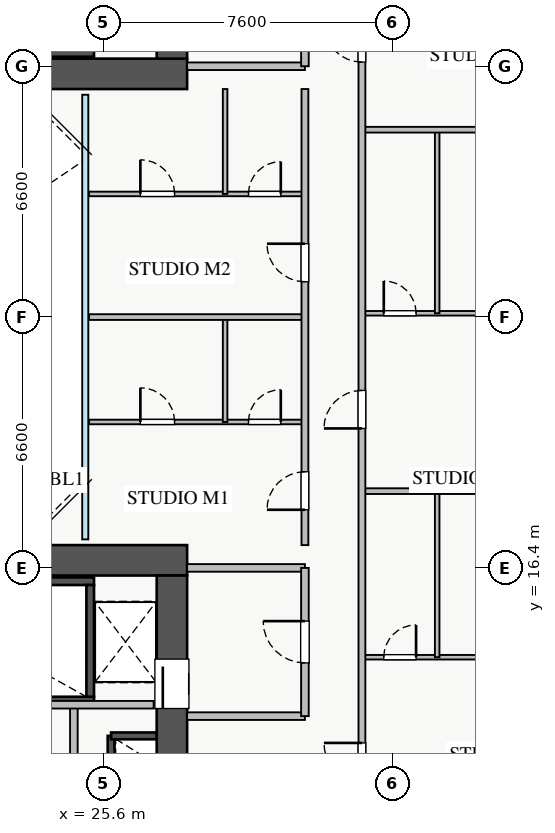
"""IFC4 building model, lengths in metres.
Left out: names, types, materials, properties, quantities, classifications, styles, units other than length and angle.
Written with IfcOpenShell. Run it as: python <this file> out.ifc"""

import sys

from ifc_helpers import new_model, si_unit, direction, frame, frame_2d, origin, place, context, subcontext, project, spatial, rectangle, extrude, source, transform, mapped, element, fill, save


model = new_model("IFC4")
c1 = context("Model", 3, precision=1e-05, world=origin(), true_north=direction((0.0, 1.0)))
c2 = subcontext(c1, "Body", "Model", "MODEL_VIEW")
j1 = project(units=[si_unit("LENGTHUNIT", "METRE"), si_unit("PLANEANGLEUNIT", "RADIAN")], contexts=[c1])
p1 = place(None, origin())
s1 = spatial("IfcSite", under=j1, at=p1, CompositionType="ELEMENT")
p2 = place(p1, origin())
s2 = spatial("IfcBuilding", under=s1, at=p2, CompositionType="ELEMENT")
p3 = place(p2, frame((0.0, 0.0, 53.5)))
s3 = spatial("IfcBuildingStorey", under=s2, at=p3, CompositionType="ELEMENT", Elevation=53.5)
p4 = place(p3, frame((25.8, 10.92, 0.0), z_axis=(0.0, 0.0, 1.0), x_axis=(0.0, 1.0, 0.0)))
e1 = element("IfcWall", 1, at=p4, inside=s3, PredefinedType="SHEAR", context=c2, shape_type="SweptSolid", body=[
    extrude(rectangle(XDim=1.06, YDim=0.18, at=frame_2d((0.53, 0.0))), origin(), (0.0, 0.0, 1.0), 3.07),
])
p5 = place(p3, frame((25.8, 11.98, 0.0), z_axis=(0.0, 0.0, 1.0), x_axis=(1.0, 0.0, 0.0)))
e2 = element("IfcWall", 2, at=p5, inside=s3, PredefinedType="SHEAR", context=c2, shape_type="SweptSolid", body=[
    extrude(rectangle(XDim=1.2, YDim=0.18, at=frame_2d((0.6, 0.0))), origin(), (0.0, 0.0, 1.0), 3.07),
])
p6 = place(p3, frame((18.2, 29.95, 0.0), z_axis=(0.0, 0.0, 1.0), x_axis=(1.0, 0.0, 0.0)))
e3 = element("IfcWall", 3, at=p6, inside=s3, PredefinedType="SHEAR", context=c2, shape_type="SweptSolid", body=[
    extrude(rectangle(XDim=7.15, YDim=0.2, at=frame_2d((3.575, 0.0))), origin(), (0.0, 0.0, 1.0), 3.25),
])
p7 = place(p3, frame((18.2, 12.91, 0.0), z_axis=(0.0, 0.0, 1.0), x_axis=(1.0, 0.0, 0.0)))
e4 = element("IfcWall", 4, at=p7, inside=s3, PredefinedType="SHEAR", context=c2, shape_type="SweptSolid", body=[
    extrude(rectangle(XDim=7.15, YDim=0.2, at=frame_2d((3.575, 0.0))), origin(), (0.0, 0.0, 1.0), 3.25),
])
p8 = place(p7, frame((0.35, 0.0, 0.0)))
e5 = element("IfcOpeningElement", 5, at=p8, cuts=e4, PredefinedType="OPENING", context=c2, shape_type="SweptSolid", body=[
    extrude(rectangle(XDim=1.1, YDim=2.05, at=frame_2d((0.55, 1.025))), frame((0.0, 0.11, 0.0), z_axis=(0.0, -1.0, 0.0), x_axis=(1.0, 0.0, 0.0)), (0.0, 0.0, 1.0), 0.22),
])
p9 = place(p3, frame((18.2, 16.05, 0.0), z_axis=(0.0, 0.0, 1.0), x_axis=(1.0, 0.0, 0.0)))
e6 = element("IfcWall", 6, at=p9, inside=s3, PredefinedType="SHEAR", context=c2, shape_type="SweptSolid", body=[
    extrude(rectangle(XDim=7.15, YDim=0.2, at=frame_2d((3.575, 0.0))), origin(), (0.0, 0.0, 1.0), 3.25),
])
p10 = place(p3, frame((25.25, 13.01, 0.0), z_axis=(0.0, 0.0, 1.0), x_axis=(0.0, 1.0, 0.0)))
e7 = element("IfcWall", 7, at=p10, inside=s3, PredefinedType="SHEAR", context=c2, shape_type="SweptSolid", body=[
    extrude(rectangle(XDim=2.94, YDim=0.2, at=frame_2d((1.47, 0.0))), origin(), (0.0, 0.0, 1.0), 3.25),
])
p11 = place(p3, frame((10.2, 29.4, 0.0), z_axis=(0.0, 0.0, 1.0), x_axis=(1.0, 0.0, 0.0)))
e8 = element("IfcWall", 8, at=p11, inside=s3, PredefinedType="SHEAR", context=c2, shape_type="SweptSolid", body=[
    extrude(rectangle(XDim=17.6, YDim=0.8, at=frame_2d((8.8, 0.0))), origin(), (0.0, 0.0, 1.0), 3.25),
])
p12 = place(p3, frame((27.4, 29.8, 0.0), z_axis=(0.0, 0.0, 1.0), x_axis=(0.0, 1.0, 0.0)))
e9 = element("IfcWall", 9, at=p12, inside=s3, PredefinedType="SHEAR", context=c2, shape_type="SweptSolid", body=[
    extrude(rectangle(XDim=5.6, YDim=0.8, at=frame_2d((2.8, 0.0))), origin(), (0.0, 0.0, 1.0), 3.25),
])
p13 = place(p12, frame((1.1, 0.0, 0.0)))
e10 = element("IfcOpeningElement", 10, at=p13, cuts=e9, PredefinedType="OPENING", context=c2, shape_type="SweptSolid", body=[
    extrude(rectangle(XDim=1.3, YDim=2.05, at=frame_2d((0.65, 1.025))), frame((0.0, 0.41, 0.0), z_axis=(0.0, -1.0, 0.0), x_axis=(1.0, 0.0, 0.0)), (0.0, 0.0, 1.0), 0.82),
])
p14 = place(p3, frame((10.2, 16.6, 0.0), z_axis=(0.0, 0.0, 1.0), x_axis=(1.0, 0.0, 0.0)))
e11 = element("IfcWall", 11, at=p14, inside=s3, PredefinedType="SHEAR", context=c2, shape_type="SweptSolid", body=[
    extrude(rectangle(XDim=17.6, YDim=0.8, at=frame_2d((8.8, 0.0))), origin(), (0.0, 0.0, 1.0), 3.25),
])
p15 = place(p3, frame((27.4, 10.6, 0.0), z_axis=(0.0, 0.0, 1.0), x_axis=(0.0, 1.0, 0.0)))
e12 = element("IfcWall", 12, at=p15, inside=s3, PredefinedType="SHEAR", context=c2, shape_type="SweptSolid", body=[
    extrude(rectangle(XDim=5.6, YDim=0.8, at=frame_2d((2.8, 0.0))), origin(), (0.0, 0.0, 1.0), 3.25),
])
p16 = place(p15, frame((2.1, 0.0, 0.0)))
e13 = element("IfcOpeningElement", 13, at=p16, cuts=e12, PredefinedType="OPENING", context=c2, shape_type="SweptSolid", body=[
    extrude(rectangle(XDim=1.3, YDim=2.05, at=frame_2d((0.65, 1.025))), frame((0.0, 0.41, 0.0), z_axis=(0.0, -1.0, 0.0), x_axis=(1.0, 0.0, 0.0)), (0.0, 0.0, 1.0), 0.82),
])
p17 = place(p3, frame((27.8, 29.6, 0.0), z_axis=(0.0, 0.0, 1.0), x_axis=(1.0, 0.0, 0.0)))
e14 = element("IfcWall", 14, at=p17, inside=s3, PredefinedType="PARTITIONING", context=c2, shape_type="SweptSolid", body=[
    extrude(rectangle(XDim=3.1, YDim=0.2, at=frame_2d((1.55, 0.0))), origin(), (0.0, 0.0, 1.0), 3.07),
])
p18 = place(p3, frame((30.9, 29.6, 0.0), z_axis=(0.0, 0.0, 1.0), x_axis=(0.0, 1.0, 0.0)))
e15 = element("IfcWall", 15, at=p18, inside=s3, PredefinedType="PARTITIONING", context=c2, shape_type="SweptSolid", body=[
    extrude(rectangle(XDim=3.9, YDim=0.2, at=frame_2d((1.95, 0.0))), origin(), (0.0, 0.0, 1.0), 3.07),
])
p19 = place(p18, frame((1.4, 0.0, 0.0)))
e16 = element("IfcOpeningElement", 16, at=p19, cuts=e15, PredefinedType="OPENING", context=c2, shape_type="SweptSolid", body=[
    extrude(rectangle(XDim=1.1, YDim=2.05, at=frame_2d((0.55, 1.025))), frame((0.0, 0.11, 0.0), z_axis=(0.0, -1.0, 0.0), x_axis=(1.0, 0.0, 0.0)), (0.0, 0.0, 1.0), 0.22),
])
for number, where, z_axis, x_axis in (
    (17, (27.8, 16.4, 0.0), (0.0, 0.0, 1.0), (1.0, 0.0, 0.0)),
    (18, (27.8, 12.5, 0.0), (0.0, 0.0, 1.0), (1.0, 0.0, 0.0)),
):
    element("IfcWall", number, at=place(p3, frame(where, z_axis=z_axis, x_axis=x_axis)), inside=s3, PredefinedType="PARTITIONING", context=c2, shape_type="SweptSolid", body=[
        extrude(rectangle(XDim=3.1, YDim=0.2, at=frame_2d((1.55, 0.0))), origin(), (0.0, 0.0, 1.0), 3.07),
    ])
p20 = place(p3, frame((30.9, 12.5, 0.0), z_axis=(0.0, 0.0, 1.0), x_axis=(0.0, 1.0, 0.0)))
e19 = element("IfcWall", 19, at=p20, inside=s3, PredefinedType="PARTITIONING", context=c2, shape_type="SweptSolid", body=[
    extrude(rectangle(XDim=3.9, YDim=0.2, at=frame_2d((1.95, 0.0))), origin(), (0.0, 0.0, 1.0), 3.07),
])
p21 = place(p20, frame((1.4, 0.0, 0.0)))
e20 = element("IfcOpeningElement", 20, at=p21, cuts=e19, PredefinedType="OPENING", context=c2, shape_type="SweptSolid", body=[
    extrude(rectangle(XDim=1.1, YDim=2.05, at=frame_2d((0.55, 1.025))), frame((0.0, 0.11, 0.0), z_axis=(0.0, -1.0, 0.0), x_axis=(1.0, 0.0, 0.0)), (0.0, 0.0, 1.0), 0.22),
])
p22 = place(p3, frame((24.82, 10.15, 0.0), z_axis=(0.0, 0.0, 1.0), x_axis=(0.0, 1.0, 0.0)))
e21 = element("IfcWall", 21, at=p22, inside=s3, PredefinedType="PARTITIONING", context=c2, shape_type="SweptSolid", body=[
    extrude(rectangle(XDim=2.65, YDim=0.2, at=frame_2d((1.325, 0.0))), origin(), (0.0, 0.0, 1.0), 3.07),
])
p23 = place(p3, frame((21.75, 12.8, 0.0), z_axis=(0.0, 0.0, 1.0), x_axis=(1.0, 0.0, 0.0)))
e22 = element("IfcWall", 22, at=p23, inside=s3, PredefinedType="PARTITIONING", context=c2, shape_type="SweptSolid", body=[
    extrude(rectangle(XDim=5.17, YDim=0.2, at=frame_2d((2.585, 0.0))), origin(), (0.0, 0.0, 1.0), 3.07),
])
p24 = place(p3, frame((32.4, 14.05, 0.0), z_axis=(0.0, 0.0, 1.0), x_axis=(1.0, 0.0, 0.0)))
e23 = element("IfcWall", 23, at=p24, inside=s3, PredefinedType="PLUMBINGWALL", context=c2, shape_type="SweptSolid", body=[
    extrude(rectangle(XDim=5.35, YDim=0.12, at=frame_2d((2.675, 0.0))), origin(), (0.0, 0.0, 1.0), 3.07),
])
p25 = place(p24, frame((0.575, 0.0, 0.0)))
e24 = element("IfcOpeningElement", 24, at=p25, cuts=e23, PredefinedType="OPENING", context=c2, shape_type="SweptSolid", body=[
    extrude(rectangle(XDim=0.85, YDim=2.05, at=frame_2d((0.425, 1.025))), frame((0.0, 0.07, 0.0), z_axis=(0.0, -1.0, 0.0), x_axis=(1.0, 0.0, 0.0)), (0.0, 0.0, 1.0), 0.14),
])
p26 = place(p24, frame((3.205, 0.0, 0.0)))
e25 = element("IfcOpeningElement", 25, at=p26, cuts=e23, PredefinedType="OPENING", context=c2, shape_type="SweptSolid", body=[
    extrude(rectangle(XDim=0.9, YDim=2.05, at=frame_2d((0.45, 1.025))), frame((0.0, 0.07, 0.0), z_axis=(0.0, -1.0, 0.0), x_axis=(1.0, 0.0, 0.0)), (0.0, 0.0, 1.0), 0.14),
])
p27 = place(p3, frame((34.38, 14.05, 0.0), z_axis=(0.0, 0.0, 1.0), x_axis=(0.0, 1.0, 0.0)))
e26 = element("IfcWall", 26, at=p27, inside=s3, PredefinedType="PLUMBINGWALL", context=c2, shape_type="SweptSolid", body=[
    extrude(rectangle(XDim=4.37, YDim=0.12, at=frame_2d((2.185, 0.0))), origin(), (0.0, 0.0, 1.0), 3.07),
])
p28 = place(p3, frame((32.4, 23.1, 0.0), z_axis=(0.0, 0.0, 1.0), x_axis=(1.0, 0.0, 0.0)))
e27 = element("IfcWall", 27, at=p28, inside=s3, PredefinedType="PLUMBINGWALL", context=c2, shape_type="SweptSolid", body=[
    extrude(rectangle(XDim=5.35, YDim=0.12, at=frame_2d((2.675, 0.0))), origin(), (0.0, 0.0, 1.0), 3.07),
])
p29 = place(p28, frame((0.575, 0.0, 0.0)))
e28 = element("IfcOpeningElement", 28, at=p29, cuts=e27, PredefinedType="OPENING", context=c2, shape_type="SweptSolid", body=[
    extrude(rectangle(XDim=0.85, YDim=2.05, at=frame_2d((0.425, 1.025))), frame((0.0, 0.07, 0.0), z_axis=(0.0, -1.0, 0.0), x_axis=(1.0, 0.0, 0.0)), (0.0, 0.0, 1.0), 0.14),
])
p30 = place(p28, frame((3.205, 0.0, 0.0)))
e29 = element("IfcOpeningElement", 29, at=p30, cuts=e27, PredefinedType="OPENING", context=c2, shape_type="SweptSolid", body=[
    extrude(rectangle(XDim=0.9, YDim=2.05, at=frame_2d((0.45, 1.025))), frame((0.0, 0.07, 0.0), z_axis=(0.0, -1.0, 0.0), x_axis=(1.0, 0.0, 0.0)), (0.0, 0.0, 1.0), 0.14),
])
p31 = place(p3, frame((34.38, 23.1, 0.0), z_axis=(0.0, 0.0, 1.0), x_axis=(0.0, 1.0, 0.0)))
e30 = element("IfcWall", 30, at=p31, inside=s3, PredefinedType="PLUMBINGWALL", context=c2, shape_type="SweptSolid", body=[
    extrude(rectangle(XDim=4.83, YDim=0.12, at=frame_2d((2.415, 0.0))), origin(), (0.0, 0.0, 1.0), 3.07),
])
p32 = place(p3, frame((32.4, 18.42, 0.0), z_axis=(0.0, 0.0, 1.0), x_axis=(1.0, 0.0, 0.0)))
e31 = element("IfcWall", 31, at=p32, inside=s3, PredefinedType="PARTITIONING", context=c2, shape_type="SweptSolid", body=[
    extrude(rectangle(XDim=5.35, YDim=0.15, at=frame_2d((2.675, 0.0))), origin(), (0.0, 0.0, 1.0), 3.07),
])
p33 = place(p3, frame((32.4, 27.93, 0.0), z_axis=(0.0, 0.0, 1.0), x_axis=(1.0, 0.0, 0.0)))
e32 = element("IfcWall", 32, at=p33, inside=s3, PredefinedType="PARTITIONING", context=c2, shape_type="SweptSolid", body=[
    extrude(rectangle(XDim=5.35, YDim=0.15, at=frame_2d((2.675, 0.0))), origin(), (0.0, 0.0, 1.0), 2.865),
])
p34 = place(p3, frame((32.4, 7.21, 0.0), z_axis=(0.0, 0.0, 1.0), x_axis=(0.0, 1.0, 0.0)))
e33 = element("IfcWall", 33, at=p34, inside=s3, PredefinedType="PARTITIONING", context=c2, shape_type="SweptSolid", body=[
    extrude(rectangle(XDim=31.23, YDim=0.18, at=frame_2d((15.615, 0.0))), origin(), (0.0, 0.0, 1.0), 2.771),
])
p35 = place(p34, frame((30.09, 0.0, 0.0)))
e34 = element("IfcOpeningElement", 34, at=p35, cuts=e33, PredefinedType="OPENING", context=c2, shape_type="SweptSolid", body=[
    extrude(rectangle(XDim=0.9, YDim=2.05, at=frame_2d((0.45, 1.025))), frame((0.0, 0.1, 0.0), z_axis=(0.0, -1.0, 0.0), x_axis=(1.0, 0.0, 0.0)), (0.0, 0.0, 1.0), 0.2),
])
p36 = place(p34, frame((0.415, 0.0, 0.0)))
e35 = element("IfcOpeningElement", 35, at=p36, cuts=e33, PredefinedType="OPENING", context=c2, shape_type="SweptSolid", body=[
    extrude(rectangle(XDim=0.9, YDim=2.05, at=frame_2d((0.45, 1.025))), frame((0.0, 0.1, 0.0), z_axis=(0.0, -1.0, 0.0), x_axis=(1.0, 0.0, 0.0)), (0.0, 0.0, 1.0), 0.2),
])
p37 = place(p34, frame((3.585, 0.0, 0.0)))
e36 = element("IfcOpeningElement", 36, at=p37, cuts=e33, PredefinedType="OPENING", context=c2, shape_type="SweptSolid", body=[
    extrude(rectangle(XDim=1.0, YDim=2.05, at=frame_2d((0.5, 1.025))), frame((0.0, 0.1, 0.0), z_axis=(0.0, -1.0, 0.0), x_axis=(1.0, 0.0, 0.0)), (0.0, 0.0, 1.0), 0.2),
])
p38 = place(p34, frame((12.86, 0.0, 0.0)))
e37 = element("IfcOpeningElement", 37, at=p38, cuts=e33, PredefinedType="OPENING", context=c2, shape_type="SweptSolid", body=[
    extrude(rectangle(XDim=1.0, YDim=2.05, at=frame_2d((0.5, 1.025))), frame((0.0, 0.1, 0.0), z_axis=(0.0, -1.0, 0.0), x_axis=(1.0, 0.0, 0.0)), (0.0, 0.0, 1.0), 0.2),
])
p39 = place(p34, frame((22.5, 0.0, 0.0)))
e38 = element("IfcOpeningElement", 38, at=p39, cuts=e33, PredefinedType="OPENING", context=c2, shape_type="SweptSolid", body=[
    extrude(rectangle(XDim=1.0, YDim=2.05, at=frame_2d((0.5, 1.025))), frame((0.0, 0.1, 0.0), z_axis=(0.0, -1.0, 0.0), x_axis=(1.0, 0.0, 0.0)), (0.0, 0.0, 1.0), 0.2),
])
p40 = place(p3, frame((25.22, 20.24, 0.0), z_axis=(0.0, 0.0, 1.0), x_axis=(1.0, 0.0, 0.0)))
e39 = element("IfcWall", 39, at=p40, inside=s3, PredefinedType="PLUMBINGWALL", context=c2, shape_type="SweptSolid", body=[
    extrude(rectangle(XDim=5.68, YDim=0.12, at=frame_2d((2.84, 0.0))), origin(), (0.0, 0.0, 1.0), 2.625),
])
p41 = place(p40, frame((1.35, 0.0, 0.0)))
e40 = element("IfcOpeningElement", 40, at=p41, cuts=e39, PredefinedType="OPENING", context=c2, shape_type="SweptSolid", body=[
    extrude(rectangle(XDim=0.9, YDim=2.05, at=frame_2d((0.45, 1.025))), frame((0.0, 0.07, 0.0), z_axis=(0.0, -1.0, 0.0), x_axis=(1.0, 0.0, 0.0)), (0.0, 0.0, 1.0), 0.14),
])
p42 = place(p40, frame((4.195, 0.0, 0.0)))
e41 = element("IfcOpeningElement", 41, at=p42, cuts=e39, PredefinedType="OPENING", context=c2, shape_type="SweptSolid", body=[
    extrude(rectangle(XDim=0.85, YDim=2.05, at=frame_2d((0.425, 1.025))), frame((0.0, 0.07, 0.0), z_axis=(0.0, -1.0, 0.0), x_axis=(1.0, 0.0, 0.0)), (0.0, 0.0, 1.0), 0.14),
])
p43 = place(p3, frame((28.8, 20.24, 0.0), z_axis=(0.0, 0.0, 1.0), x_axis=(0.0, 1.0, 0.0)))
e42 = element("IfcWall", 42, at=p43, inside=s3, PredefinedType="PLUMBINGWALL", context=c2, shape_type="SweptSolid", body=[
    extrude(rectangle(XDim=2.76, YDim=0.12, at=frame_2d((1.38, 0.0))), origin(), (0.0, 0.0, 1.0), 3.07),
])
p44 = place(p3, frame((25.22, 26.24, 0.0), z_axis=(0.0, 0.0, 1.0), x_axis=(1.0, 0.0, 0.0)))
e43 = element("IfcWall", 43, at=p44, inside=s3, PredefinedType="PLUMBINGWALL", context=c2, shape_type="SweptSolid", body=[
    extrude(rectangle(XDim=5.68, YDim=0.12, at=frame_2d((2.84, 0.0))), origin(), (0.0, 0.0, 1.0), 2.625),
])
p45 = place(p44, frame((1.35, 0.0, 0.0)))
e44 = element("IfcOpeningElement", 44, at=p45, cuts=e43, PredefinedType="OPENING", context=c2, shape_type="SweptSolid", body=[
    extrude(rectangle(XDim=0.9, YDim=2.05, at=frame_2d((0.45, 1.025))), frame((0.0, 0.07, 0.0), z_axis=(0.0, -1.0, 0.0), x_axis=(1.0, 0.0, 0.0)), (0.0, 0.0, 1.0), 0.14),
])
p46 = place(p44, frame((4.195, 0.0, 0.0)))
e45 = element("IfcOpeningElement", 45, at=p46, cuts=e43, PredefinedType="OPENING", context=c2, shape_type="SweptSolid", body=[
    extrude(rectangle(XDim=0.85, YDim=2.05, at=frame_2d((0.425, 1.025))), frame((0.0, 0.07, 0.0), z_axis=(0.0, -1.0, 0.0), x_axis=(1.0, 0.0, 0.0)), (0.0, 0.0, 1.0), 0.14),
])
p47 = place(p3, frame((28.8, 26.24, 0.0), z_axis=(0.0, 0.0, 1.0), x_axis=(0.0, 1.0, 0.0)))
e46 = element("IfcWall", 46, at=p47, inside=s3, PredefinedType="PLUMBINGWALL", context=c2, shape_type="SweptSolid", body=[
    extrude(rectangle(XDim=2.76, YDim=0.12, at=frame_2d((1.38, 0.0))), origin(), (0.0, 0.0, 1.0), 3.07),
])
p48 = place(p3, frame((25.22, 23.0, 0.0), z_axis=(0.0, 0.0, 1.0), x_axis=(1.0, 0.0, 0.0)))
e47 = element("IfcWall", 47, at=p48, inside=s3, PredefinedType="PARTITIONING", context=c2, shape_type="SweptSolid", body=[
    extrude(rectangle(XDim=5.68, YDim=0.15, at=frame_2d((2.84, 0.0))), origin(), (0.0, 0.0, 1.0), 3.07),
])
p49 = place(p3, frame((30.9, 17.0, 0.0), z_axis=(0.0, 0.0, 1.0), x_axis=(0.0, 1.0, 0.0)))
e48 = element("IfcWall", 48, at=p49, inside=s3, PredefinedType="PARTITIONING", context=c2, shape_type="SweptSolid", body=[
    extrude(rectangle(XDim=12.0, YDim=0.18, at=frame_2d((6.0, 0.0))), origin(), (0.0, 0.0, 1.0), 3.07),
])
p50 = place(p49, frame((0.93, 0.0, 0.0)))
e49 = element("IfcOpeningElement", 49, at=p50, cuts=e48, PredefinedType="OPENING", context=c2, shape_type="SweptSolid", body=[
    extrude(rectangle(XDim=1.0, YDim=2.05, at=frame_2d((0.5, 1.025))), frame((0.0, 0.1, 0.0), z_axis=(0.0, -1.0, 0.0), x_axis=(1.0, 0.0, 0.0)), (0.0, 0.0, 1.0), 0.2),
])
p51 = place(p49, frame((6.93, 0.0, 0.0)))
e50 = element("IfcOpeningElement", 50, at=p51, cuts=e48, PredefinedType="OPENING", context=c2, shape_type="SweptSolid", body=[
    extrude(rectangle(XDim=1.0, YDim=2.05, at=frame_2d((0.5, 1.025))), frame((0.0, 0.1, 0.0), z_axis=(0.0, -1.0, 0.0), x_axis=(1.0, 0.0, 0.0)), (0.0, 0.0, 1.0), 0.2),
])
m1 = source(origin(), c2, "Body", "SweptSolid", [
    extrude(rectangle(XDim=1.3, YDim=2.05, at=frame_2d((0.65, 1.025))), frame((0.0, 0.025, 0.0), z_axis=(0.0, -1.0, 0.0), x_axis=(1.0, 0.0, 0.0)), (0.0, 0.0, 1.0), 0.05),
])
p52 = place(p16, origin())
e51 = element("IfcDoor", 51, at=p52, inside=s3, OperationType="SLIDING_TO_RIGHT", PredefinedType="DOOR", context=c2, shape_type="MappedRepresentation", body=[
    mapped(m1, transform((0.0, 0.0, 0.0), x_axis=(1.0, 0.0, 0.0), y_axis=(0.0, 1.0, 0.0), z_axis=(0.0, 0.0, 1.0), scale=1.0)),
])
fill(e13, e51)
m2 = source(origin(), c2, "Body", "SweptSolid", [
    extrude(rectangle(XDim=1.1, YDim=2.05, at=frame_2d((0.55, 1.025))), frame((0.0, 0.025, 0.0), z_axis=(0.0, -1.0, 0.0), x_axis=(1.0, 0.0, 0.0)), (0.0, 0.0, 1.0), 0.05),
])
p53 = place(p21, origin())
e52 = element("IfcDoor", 52, at=p53, inside=s3, OperationType="SINGLE_SWING_RIGHT", PredefinedType="DOOR", context=c2, shape_type="MappedRepresentation", body=[
    mapped(m2, transform((0.0, 0.0, 0.0), x_axis=(1.0, 0.0, 0.0), y_axis=(0.0, 1.0, 0.0), z_axis=(0.0, 0.0, 1.0), scale=1.0)),
])
fill(e20, e52)
m3 = source(origin(), c2, "Body", "SweptSolid", [
    extrude(rectangle(XDim=0.85, YDim=2.05, at=frame_2d((0.425, 1.025))), frame((0.0, 0.025, 0.0), z_axis=(0.0, -1.0, 0.0), x_axis=(1.0, 0.0, 0.0)), (0.0, 0.0, 1.0), 0.05),
])
p54 = place(p25, origin())
e53 = element("IfcDoor", 53, at=p54, inside=s3, OperationType="SINGLE_SWING_RIGHT", PredefinedType="DOOR", context=c2, shape_type="MappedRepresentation", body=[
    mapped(m3, transform((0.0, 0.0, 0.0), x_axis=(1.0, 0.0, 0.0), y_axis=(0.0, 1.0, 0.0), z_axis=(0.0, 0.0, 1.0), scale=1.0)),
])
fill(e24, e53)
p55 = place(p29, origin())
e54 = element("IfcDoor", 54, at=p55, inside=s3, OperationType="SINGLE_SWING_LEFT", PredefinedType="DOOR", context=c2, shape_type="MappedRepresentation", body=[
    mapped(m3, transform((0.0, 0.0, 0.0), x_axis=(1.0, 0.0, 0.0), y_axis=(0.0, 1.0, 0.0), z_axis=(0.0, 0.0, 1.0), scale=1.0)),
])
fill(e28, e54)
m4 = source(origin(), c2, "Body", "SweptSolid", [
    extrude(rectangle(XDim=1.0, YDim=2.05, at=frame_2d((0.5, 1.025))), frame((0.0, 0.025, 0.0), z_axis=(0.0, -1.0, 0.0), x_axis=(1.0, 0.0, 0.0)), (0.0, 0.0, 1.0), 0.05),
])
p56 = place(p37, origin())
e55 = element("IfcDoor", 55, at=p56, inside=s3, OperationType="SINGLE_SWING_RIGHT", PredefinedType="DOOR", context=c2, shape_type="MappedRepresentation", body=[
    mapped(m4, transform((0.0, 0.0, 0.0), x_axis=(1.0, 0.0, 0.0), y_axis=(0.0, 1.0, 0.0), z_axis=(0.0, 0.0, 1.0), scale=1.0)),
])
fill(e36, e55)
p57 = place(p38, origin())
e56 = element("IfcDoor", 56, at=p57, inside=s3, OperationType="SINGLE_SWING_LEFT", PredefinedType="DOOR", context=c2, shape_type="MappedRepresentation", body=[
    mapped(m4, transform((0.0, 0.0, 0.0), x_axis=(1.0, 0.0, 0.0), y_axis=(0.0, 1.0, 0.0), z_axis=(0.0, 0.0, 1.0), scale=1.0)),
])
fill(e37, e56)
p58 = place(p39, origin())
e57 = element("IfcDoor", 57, at=p58, inside=s3, OperationType="SINGLE_SWING_RIGHT", PredefinedType="DOOR", context=c2, shape_type="MappedRepresentation", body=[
    mapped(m4, transform((0.0, 0.0, 0.0), x_axis=(1.0, 0.0, 0.0), y_axis=(0.0, 1.0, 0.0), z_axis=(0.0, 0.0, 1.0), scale=1.0)),
])
fill(e38, e57)
m5 = source(origin(), c2, "Body", "SweptSolid", [
    extrude(rectangle(XDim=0.9, YDim=2.05, at=frame_2d((0.45, 1.025))), frame((0.0, 0.025, 0.0), z_axis=(0.0, -1.0, 0.0), x_axis=(1.0, 0.0, 0.0)), (0.0, 0.0, 1.0), 0.05),
])
p59 = place(p41, origin())
e58 = element("IfcDoor", 58, at=p59, inside=s3, OperationType="SINGLE_SWING_LEFT", PredefinedType="DOOR", context=c2, shape_type="MappedRepresentation", body=[
    mapped(m5, transform((0.0, 0.0, 0.0), x_axis=(1.0, 0.0, 0.0), y_axis=(0.0, 1.0, 0.0), z_axis=(0.0, 0.0, 1.0), scale=1.0)),
])
fill(e40, e58)
p60 = place(p42, origin())
e59 = element("IfcDoor", 59, at=p60, inside=s3, OperationType="SINGLE_SWING_RIGHT", PredefinedType="DOOR", context=c2, shape_type="MappedRepresentation", body=[
    mapped(m3, transform((0.0, 0.0, 0.0), x_axis=(1.0, 0.0, 0.0), y_axis=(0.0, 1.0, 0.0), z_axis=(0.0, 0.0, 1.0), scale=1.0)),
])
fill(e41, e59)
p61 = place(p45, origin())
e60 = element("IfcDoor", 60, at=p61, inside=s3, OperationType="SINGLE_SWING_LEFT", PredefinedType="DOOR", context=c2, shape_type="MappedRepresentation", body=[
    mapped(m5, transform((0.0, 0.0, 0.0), x_axis=(1.0, 0.0, 0.0), y_axis=(0.0, 1.0, 0.0), z_axis=(0.0, 0.0, 1.0), scale=1.0)),
])
fill(e44, e60)
p62 = place(p46, origin())
e61 = element("IfcDoor", 61, at=p62, inside=s3, OperationType="SINGLE_SWING_RIGHT", PredefinedType="DOOR", context=c2, shape_type="MappedRepresentation", body=[
    mapped(m3, transform((0.0, 0.0, 0.0), x_axis=(1.0, 0.0, 0.0), y_axis=(0.0, 1.0, 0.0), z_axis=(0.0, 0.0, 1.0), scale=1.0)),
])
fill(e45, e61)
p63 = place(p50, origin())
e62 = element("IfcDoor", 62, at=p63, inside=s3, OperationType="SINGLE_SWING_LEFT", PredefinedType="DOOR", context=c2, shape_type="MappedRepresentation", body=[
    mapped(m4, transform((0.0, 0.0, 0.0), x_axis=(1.0, 0.0, 0.0), y_axis=(0.0, 1.0, 0.0), z_axis=(0.0, 0.0, 1.0), scale=1.0)),
])
fill(e49, e62)
p64 = place(p51, origin())
e63 = element("IfcDoor", 63, at=p64, inside=s3, OperationType="SINGLE_SWING_RIGHT", PredefinedType="DOOR", context=c2, shape_type="MappedRepresentation", body=[
    mapped(m4, transform((0.0, 0.0, 0.0), x_axis=(1.0, 0.0, 0.0), y_axis=(0.0, 1.0, 0.0), z_axis=(0.0, 0.0, 1.0), scale=1.0)),
])
fill(e50, e63)
save(model, sys.argv[1])
